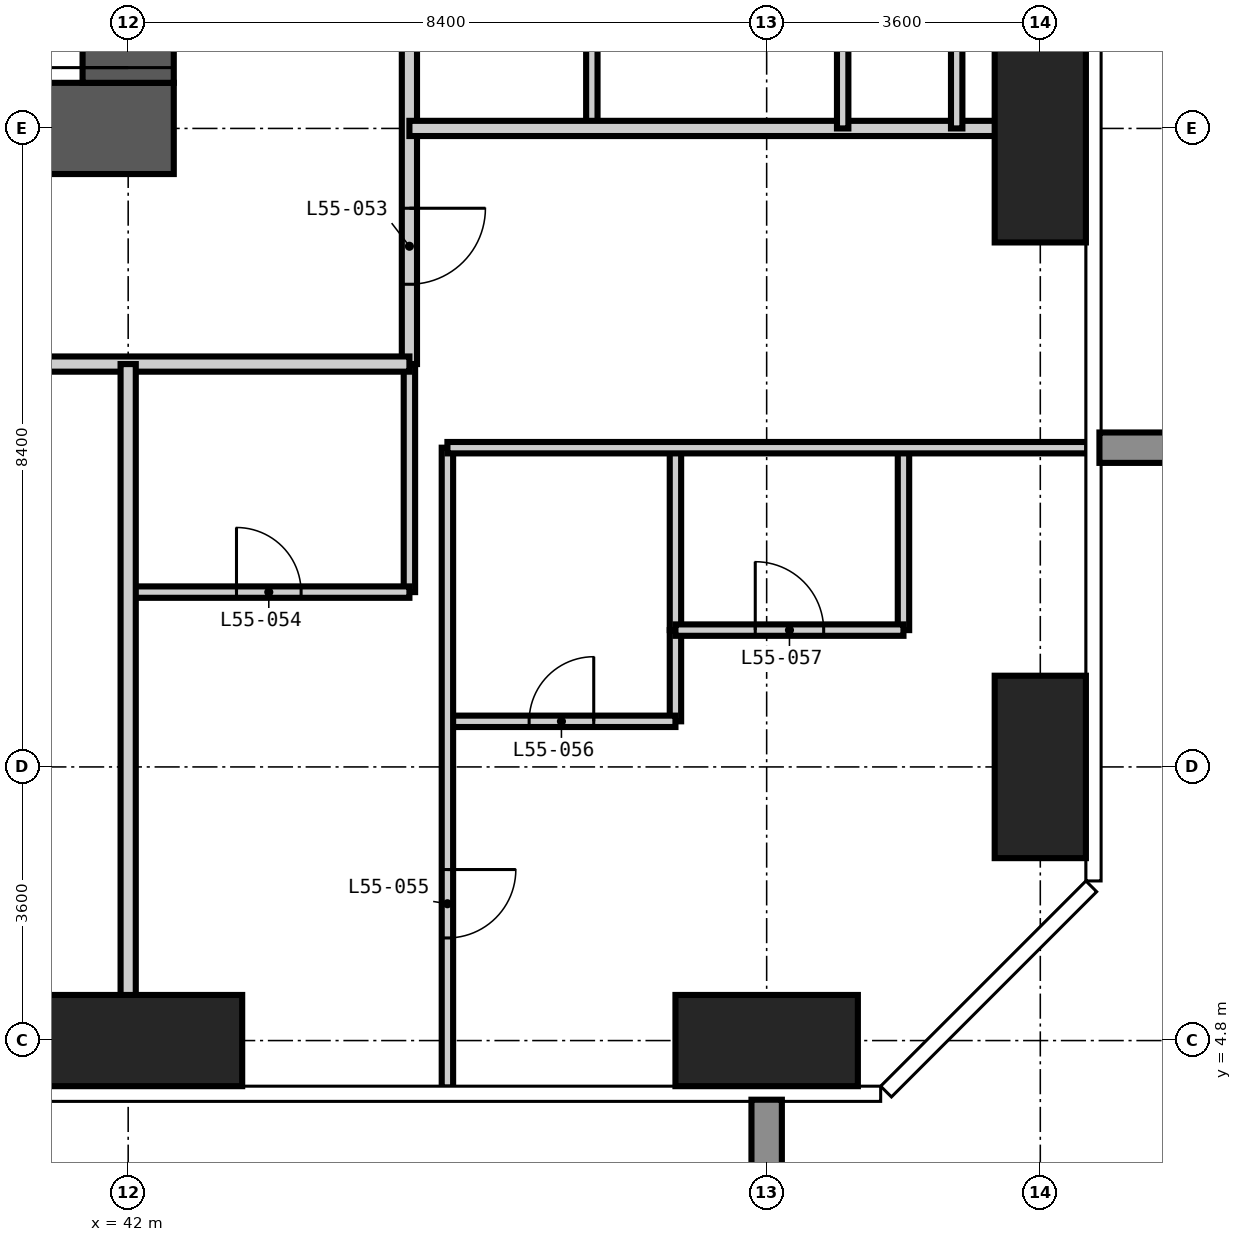
"""IFC4 building model, lengths in metres.
Left out: names, types, materials, properties, quantities, classifications, styles, units other than length and angle.
Written with IfcOpenShell. Run it as: python <this file> out.ifc"""

import sys

from ifc_helpers import new_model, si_unit, direction, frame, frame_2d, origin, origin_2d, place, context, subcontext, project, spatial, rectangle, extrude, element, fill, save


model = new_model("IFC4")
c1 = context("Model", 3, precision=1e-05, world=origin(), true_north=direction((0.0, 1.0)))
c2 = subcontext(c1, "Body", "Model", "MODEL_VIEW")
j1 = project(units=[si_unit("LENGTHUNIT", "METRE"), si_unit("PLANEANGLEUNIT", "RADIAN")], contexts=[c1])
p1 = place(None, origin())
s1 = spatial("IfcSite", under=j1, at=p1, CompositionType="ELEMENT")
p2 = place(p1, origin())
s2 = spatial("IfcBuilding", under=s1, at=p2, CompositionType="ELEMENT")
p3 = place(p2, frame((0.0, 0.0, 213.0)))
s3 = spatial("IfcBuildingStorey", under=s2, at=p3, CompositionType="ELEMENT", Elevation=213.0)
p4 = place(p3, frame((42.0, 4.8, -0.35), z_axis=(0.0, 0.0, 1.0), x_axis=(1.0, 0.0, 0.0)))
e1 = element("IfcColumn", 1, at=p4, inside=s3, PredefinedType="COLUMN", context=c2, shape_type="SweptSolid", body=[
    extrude(rectangle(XDim=3.0, YDim=1.2, at=origin_2d()), origin(), (0.0, 0.0, 1.0), 3.6),
])
p5 = place(p3, frame((50.4, 4.8, -0.35), z_axis=(0.0, 0.0, 1.0), x_axis=(1.0, 0.0, 0.0)))
e2 = element("IfcColumn", 2, at=p5, inside=s3, PredefinedType="COLUMN", context=c2, shape_type="SweptSolid", body=[
    extrude(rectangle(XDim=2.4, YDim=1.2, at=origin_2d()), origin(), (0.0, 0.0, 1.0), 3.6),
])
p6 = place(p3, frame((54.0, 8.4, -0.35), z_axis=(0.0, 0.0, 1.0), x_axis=(1.0, 0.0, 0.0)))
e3 = element("IfcColumn", 3, at=p6, inside=s3, PredefinedType="COLUMN", context=c2, shape_type="SweptSolid", body=[
    extrude(rectangle(XDim=1.2, YDim=2.4, at=origin_2d()), origin(), (0.0, 0.0, 1.0), 3.6),
])
p7 = place(p3, frame((54.0, 16.8, -0.35), z_axis=(0.0, 0.0, 1.0), x_axis=(1.0, 0.0, 0.0)))
e4 = element("IfcColumn", 4, at=p7, inside=s3, PredefinedType="COLUMN", context=c2, shape_type="SweptSolid", body=[
    extrude(rectangle(XDim=1.2, YDim=3.0, at=origin_2d()), origin(), (0.0, 0.0, 1.0), 3.6),
])
p8 = place(p3, frame((16.2, 16.8, -0.35), z_axis=(0.0, 0.0, 1.0), x_axis=(1.0, 0.0, 0.0)))
e5 = element("IfcWall", 5, at=p8, inside=s3, PredefinedType="SHEAR", context=c2, shape_type="SweptSolid", body=[
    extrude(rectangle(XDim=26.4, YDim=1.2, at=frame_2d((13.2, 0.0))), origin(), (0.0, 0.0, 1.0), 3.6),
])
p9 = place(p8, frame((12.7, 0.0, 0.35)))
e6 = element("IfcOpeningElement", 6, at=p9, cuts=e5, PredefinedType="OPENING", context=c2, shape_type="SweptSolid", body=[
    extrude(rectangle(XDim=1.0, YDim=2.1, at=frame_2d((0.5, 1.05))), frame((0.0, 0.61, 0.0), z_axis=(0.0, -1.0, 0.0), x_axis=(1.0, 0.0, 0.0)), (0.0, 0.0, 1.0), 1.22),
])
p10 = place(p8, frame((19.0, 0.0, 0.35)))
e7 = element("IfcOpeningElement", 7, at=p10, cuts=e5, PredefinedType="OPENING", context=c2, shape_type="SweptSolid", body=[
    extrude(rectangle(XDim=1.0, YDim=2.1, at=frame_2d((0.5, 1.05))), frame((0.0, 0.61, 0.0), z_axis=(0.0, -1.0, 0.0), x_axis=(1.0, 0.0, 0.0)), (0.0, 0.0, 1.0), 1.22),
])
p11 = place(p3, frame((42.0, 17.4, -0.35), z_axis=(0.0, 0.0, 1.0), x_axis=(0.0, 1.0, 0.0)))
e8 = element("IfcWall", 8, at=p11, inside=s3, PredefinedType="SHEAR", context=c2, shape_type="SweptSolid", body=[
    extrude(rectangle(XDim=24.0, YDim=1.2, at=frame_2d((12.0, 0.0))), origin(), (0.0, 0.0, 1.0), 3.6),
])
p12 = place(p11, frame((0.2, 0.0, 0.35)))
e9 = element("IfcOpeningElement", 9, at=p12, cuts=e8, PredefinedType="OPENING", context=c2, shape_type="SweptSolid", body=[
    extrude(rectangle(XDim=1.2, YDim=2.2, at=frame_2d((0.6, 1.1))), frame((0.0, 0.61, 0.0), z_axis=(0.0, -1.0, 0.0), x_axis=(1.0, 0.0, 0.0)), (0.0, 0.0, 1.0), 1.22),
])
p13 = place(p11, frame((11.5, 0.0, 0.35)))
e10 = element("IfcOpeningElement", 10, at=p13, cuts=e8, PredefinedType="OPENING", context=c2, shape_type="SweptSolid", body=[
    extrude(rectangle(XDim=1.0, YDim=2.1, at=frame_2d((0.5, 1.05))), frame((0.0, 0.61, 0.0), z_axis=(0.0, -1.0, 0.0), x_axis=(1.0, 0.0, 0.0)), (0.0, 0.0, 1.0), 1.22),
])
p14 = place(p11, frame((19.9, 0.0, 0.35)))
e11 = element("IfcOpeningElement", 11, at=p14, cuts=e8, PredefinedType="OPENING", context=c2, shape_type="SweptSolid", body=[
    extrude(rectangle(XDim=1.0, YDim=2.1, at=frame_2d((0.5, 1.05))), frame((0.0, 0.61, 0.0), z_axis=(0.0, -1.0, 0.0), x_axis=(1.0, 0.0, 0.0)), (0.0, 0.0, 1.0), 1.22),
])
p15 = place(p3, frame((45.7, 10.7, 0.0), z_axis=(0.0, 0.0, 1.0), x_axis=(0.0, 1.0, 0.0)))
e12 = element("IfcWall", 12, at=p15, inside=s3, PredefinedType="PARTITIONING", context=c2, shape_type="SweptSolid", body=[
    extrude(rectangle(XDim=3.0, YDim=0.15, at=frame_2d((1.5, 0.0))), origin(), (0.0, 0.0, 1.0), 3.25),
])
p16 = place(p3, frame((48.1, 16.8, 0.0), z_axis=(0.0, 0.0, 1.0), x_axis=(0.0, 1.0, 0.0)))
e13 = element("IfcWall", 13, at=p16, inside=s3, PredefinedType="PARTITIONING", context=c2, shape_type="SweptSolid", body=[
    extrude(rectangle(XDim=2.7, YDim=0.15, at=frame_2d((1.35, 0.0))), origin(), (0.0, 0.0, 1.0), 3.25),
])
p17 = place(p3, frame((49.2, 9.0, 0.0), z_axis=(0.0, 0.0, 1.0), x_axis=(0.0, 1.0, 0.0)))
e14 = element("IfcWall", 14, at=p17, inside=s3, PredefinedType="PARTITIONING", context=c2, shape_type="SweptSolid", body=[
    extrude(rectangle(XDim=1.2, YDim=0.15, at=frame_2d((0.6, 0.0))), origin(), (0.0, 0.0, 1.0), 3.25),
])
p18 = place(p3, frame((46.2, 9.0, 0.0), z_axis=(0.0, 0.0, 1.0), x_axis=(1.0, 0.0, 0.0)))
e15 = element("IfcWall", 15, at=p18, inside=s3, PredefinedType="PARTITIONING", context=c2, shape_type="SweptSolid", body=[
    extrude(rectangle(XDim=3.0, YDim=0.15, at=frame_2d((1.5, 0.0))), origin(), (0.0, 0.0, 1.0), 3.25),
])
p19 = place(p18, frame((1.075, 0.0, 0.0)))
e16 = element("IfcOpeningElement", 16, at=p19, cuts=e15, PredefinedType="OPENING", context=c2, shape_type="SweptSolid", body=[
    extrude(rectangle(XDim=0.85, YDim=2.1, at=frame_2d((0.425, 1.05))), frame((0.0, 0.085, 0.0), z_axis=(0.0, -1.0, 0.0), x_axis=(1.0, 0.0, 0.0)), (0.0, 0.0, 1.0), 0.17),
])
p20 = place(p3, frame((42.0, 10.7, 0.0), z_axis=(0.0, 0.0, 1.0), x_axis=(1.0, 0.0, 0.0)))
e17 = element("IfcWall", 17, at=p20, inside=s3, PredefinedType="PARTITIONING", context=c2, shape_type="SweptSolid", body=[
    extrude(rectangle(XDim=3.7, YDim=0.15, at=frame_2d((1.85, 0.0))), origin(), (0.0, 0.0, 1.0), 3.25),
])
p21 = place(p20, frame((1.425, 0.0, 0.0)))
e18 = element("IfcOpeningElement", 18, at=p21, cuts=e17, PredefinedType="OPENING", context=c2, shape_type="SweptSolid", body=[
    extrude(rectangle(XDim=0.85, YDim=2.1, at=frame_2d((0.425, 1.05))), frame((0.0, 0.085, 0.0), z_axis=(0.0, -1.0, 0.0), x_axis=(1.0, 0.0, 0.0)), (0.0, 0.0, 1.0), 0.17),
])
p22 = place(p3, frame((45.7, 44.5, 0.0), z_axis=(0.0, 0.0, 1.0), x_axis=(0.0, -1.0, 0.0)))
e19 = element("IfcWall", 19, at=p22, inside=s3, PredefinedType="PARTITIONING", context=c2, shape_type="SweptSolid", body=[
    extrude(rectangle(XDim=30.8, YDim=0.2, at=frame_2d((15.4, 0.0))), origin(), (0.0, 0.0, 1.0), 3.25),
])
p23 = place(p22, frame((23.0, 0.0, 0.0)))
e20 = element("IfcOpeningElement", 20, at=p23, cuts=e19, PredefinedType="OPENING", context=c2, shape_type="SweptSolid", body=[
    extrude(rectangle(XDim=1.0, YDim=2.2, at=frame_2d((0.5, 1.1))), frame((0.0, 0.11, 0.0), z_axis=(0.0, -1.0, 0.0), x_axis=(1.0, 0.0, 0.0)), (0.0, 0.0, 1.0), 0.22),
])
p24 = place(p22, frame((14.6, 0.0, 0.0)))
e21 = element("IfcOpeningElement", 21, at=p24, cuts=e19, PredefinedType="OPENING", context=c2, shape_type="SweptSolid", body=[
    extrude(rectangle(XDim=1.0, YDim=2.2, at=frame_2d((0.5, 1.1))), frame((0.0, 0.11, 0.0), z_axis=(0.0, -1.0, 0.0), x_axis=(1.0, 0.0, 0.0)), (0.0, 0.0, 1.0), 0.22),
])
p25 = place(p22, frame((6.2, 0.0, 0.0)))
e22 = element("IfcOpeningElement", 22, at=p25, cuts=e19, PredefinedType="OPENING", context=c2, shape_type="SweptSolid", body=[
    extrude(rectangle(XDim=1.0, YDim=2.2, at=frame_2d((0.5, 1.1))), frame((0.0, 0.11, 0.0), z_axis=(0.0, -1.0, 0.0), x_axis=(1.0, 0.0, 0.0)), (0.0, 0.0, 1.0), 0.22),
])
p26 = place(p22, frame((28.75, 0.0, 0.0)))
e23 = element("IfcOpeningElement", 23, at=p26, cuts=e19, PredefinedType="OPENING", context=c2, shape_type="SweptSolid", body=[
    extrude(rectangle(XDim=1.0, YDim=2.2, at=frame_2d((0.5, 1.1))), frame((0.0, 0.11, 0.0), z_axis=(0.0, -1.0, 0.0), x_axis=(1.0, 0.0, 0.0)), (0.0, 0.0, 1.0), 0.22),
])
p27 = place(p22, frame((0.75, 0.0, 0.0)))
e24 = element("IfcOpeningElement", 24, at=p27, cuts=e19, PredefinedType="OPENING", context=c2, shape_type="SweptSolid", body=[
    extrude(rectangle(XDim=1.0, YDim=2.2, at=frame_2d((0.5, 1.1))), frame((0.0, 0.11, 0.0), z_axis=(0.0, -1.0, 0.0), x_axis=(1.0, 0.0, 0.0)), (0.0, 0.0, 1.0), 0.22),
])
p28 = place(p3, frame((45.7, 13.7, 0.0), z_axis=(0.0, 0.0, 1.0), x_axis=(-1.0, 0.0, 0.0)))
e25 = element("IfcWall", 25, at=p28, inside=s3, PredefinedType="PARTITIONING", context=c2, shape_type="SweptSolid", body=[
    extrude(rectangle(XDim=32.0, YDim=0.2, at=frame_2d((16.0, 0.0))), origin(), (0.0, 0.0, 1.0), 3.25),
])
p29 = place(p28, frame((26.3, 0.0, 0.0)))
e26 = element("IfcOpeningElement", 26, at=p29, cuts=e25, PredefinedType="OPENING", context=c2, shape_type="SweptSolid", body=[
    extrude(rectangle(XDim=1.0, YDim=2.2, at=frame_2d((0.5, 1.1))), frame((0.0, 0.11, 0.0), z_axis=(0.0, -1.0, 0.0), x_axis=(1.0, 0.0, 0.0)), (0.0, 0.0, 1.0), 0.22),
])
p30 = place(p28, frame((22.1, 0.0, 0.0)))
e27 = element("IfcOpeningElement", 27, at=p30, cuts=e25, PredefinedType="OPENING", context=c2, shape_type="SweptSolid", body=[
    extrude(rectangle(XDim=1.0, YDim=2.2, at=frame_2d((0.5, 1.1))), frame((0.0, 0.11, 0.0), z_axis=(0.0, -1.0, 0.0), x_axis=(1.0, 0.0, 0.0)), (0.0, 0.0, 1.0), 0.22),
])
p31 = place(p28, frame((17.9, 0.0, 0.0)))
e28 = element("IfcOpeningElement", 28, at=p31, cuts=e25, PredefinedType="OPENING", context=c2, shape_type="SweptSolid", body=[
    extrude(rectangle(XDim=1.0, YDim=2.2, at=frame_2d((0.5, 1.1))), frame((0.0, 0.11, 0.0), z_axis=(0.0, -1.0, 0.0), x_axis=(1.0, 0.0, 0.0)), (0.0, 0.0, 1.0), 0.22),
])
p32 = place(p28, frame((13.7, 0.0, 0.0)))
e29 = element("IfcOpeningElement", 29, at=p32, cuts=e25, PredefinedType="OPENING", context=c2, shape_type="SweptSolid", body=[
    extrude(rectangle(XDim=1.0, YDim=2.2, at=frame_2d((0.5, 1.1))), frame((0.0, 0.11, 0.0), z_axis=(0.0, -1.0, 0.0), x_axis=(1.0, 0.0, 0.0)), (0.0, 0.0, 1.0), 0.22),
])
p33 = place(p28, frame((9.5, 0.0, 0.0)))
e30 = element("IfcOpeningElement", 30, at=p33, cuts=e25, PredefinedType="OPENING", context=c2, shape_type="SweptSolid", body=[
    extrude(rectangle(XDim=1.0, YDim=2.2, at=frame_2d((0.5, 1.1))), frame((0.0, 0.11, 0.0), z_axis=(0.0, -1.0, 0.0), x_axis=(1.0, 0.0, 0.0)), (0.0, 0.0, 1.0), 0.22),
])
p34 = place(p28, frame((5.3, 0.0, 0.0)))
e31 = element("IfcOpeningElement", 31, at=p34, cuts=e25, PredefinedType="OPENING", context=c2, shape_type="SweptSolid", body=[
    extrude(rectangle(XDim=1.0, YDim=2.2, at=frame_2d((0.5, 1.1))), frame((0.0, 0.11, 0.0), z_axis=(0.0, -1.0, 0.0), x_axis=(1.0, 0.0, 0.0)), (0.0, 0.0, 1.0), 0.22),
])
p35 = place(p3, frame((42.0, 4.182, 0.0), z_axis=(0.0, 0.0, 1.0), x_axis=(0.0, 1.0, 0.0)))
e32 = element("IfcWall", 32, at=p35, inside=s3, PredefinedType="PARTITIONING", context=c2, shape_type="SweptSolid", body=[
    extrude(rectangle(XDim=9.518, YDim=0.2, at=frame_2d((4.759, 0.0))), origin(), (0.0, 0.0, 1.0), 3.25),
])
p36 = place(p3, frame((45.7, 16.8, 0.0), z_axis=(0.0, 0.0, 1.0), x_axis=(1.0, 0.0, 0.0)))
e33 = element("IfcWall", 33, at=p36, inside=s3, PredefinedType="PARTITIONING", context=c2, shape_type="SweptSolid", body=[
    extrude(rectangle(XDim=8.918, YDim=0.2, at=frame_2d((4.459, 0.0))), origin(), (0.0, 0.0, 1.0), 3.25),
])
p37 = place(p3, frame((46.2, 4.182, 0.0), z_axis=(0.0, 0.0, 1.0), x_axis=(0.0, 1.0, 0.0)))
e34 = element("IfcWall", 34, at=p37, inside=s3, PredefinedType="PARTITIONING", context=c2, shape_type="SweptSolid", body=[
    extrude(rectangle(XDim=8.418, YDim=0.15, at=frame_2d((4.209, 0.0))), origin(), (0.0, 0.0, 1.0), 3.25),
])
p38 = place(p37, frame((1.968, 0.0, 0.0)))
e35 = element("IfcOpeningElement", 35, at=p38, cuts=e34, PredefinedType="OPENING", context=c2, shape_type="SweptSolid", body=[
    extrude(rectangle(XDim=0.9, YDim=2.1, at=frame_2d((0.45, 1.05))), frame((0.0, 0.085, 0.0), z_axis=(0.0, -1.0, 0.0), x_axis=(1.0, 0.0, 0.0)), (0.0, 0.0, 1.0), 0.17),
])
p39 = place(p3, frame((49.2, 10.2, 0.0), z_axis=(0.0, 0.0, 1.0), x_axis=(0.0, 1.0, 0.0)))
e36 = element("IfcWall", 36, at=p39, inside=s3, PredefinedType="PARTITIONING", context=c2, shape_type="SweptSolid", body=[
    extrude(rectangle(XDim=2.4, YDim=0.15, at=frame_2d((1.2, 0.0))), origin(), (0.0, 0.0, 1.0), 3.25),
])
p40 = place(p3, frame((51.4, 16.8, 0.0), z_axis=(0.0, 0.0, 1.0), x_axis=(0.0, 1.0, 0.0)))
e37 = element("IfcWall", 37, at=p40, inside=s3, PredefinedType="PARTITIONING", context=c2, shape_type="SweptSolid", body=[
    extrude(rectangle(XDim=2.7, YDim=0.15, at=frame_2d((1.35, 0.0))), origin(), (0.0, 0.0, 1.0), 3.25),
])
p41 = place(p3, frame((52.2, 10.2, 0.0), z_axis=(0.0, 0.0, 1.0), x_axis=(0.0, 1.0, 0.0)))
e38 = element("IfcWall", 38, at=p41, inside=s3, PredefinedType="PARTITIONING", context=c2, shape_type="SweptSolid", body=[
    extrude(rectangle(XDim=2.4, YDim=0.15, at=frame_2d((1.2, 0.0))), origin(), (0.0, 0.0, 1.0), 3.25),
])
p42 = place(p3, frame((52.9, 16.8, 0.0), z_axis=(0.0, 0.0, 1.0), x_axis=(0.0, 1.0, 0.0)))
e39 = element("IfcWall", 39, at=p42, inside=s3, PredefinedType="PARTITIONING", context=c2, shape_type="SweptSolid", body=[
    extrude(rectangle(XDim=2.7, YDim=0.15, at=frame_2d((1.35, 0.0))), origin(), (0.0, 0.0, 1.0), 3.25),
])
p43 = place(p42, frame((1.6, 0.0, 0.0)))
e40 = element("IfcOpeningElement", 40, at=p43, cuts=e39, PredefinedType="OPENING", context=c2, shape_type="SweptSolid", body=[
    extrude(rectangle(XDim=0.9, YDim=2.1, at=frame_2d((0.45, 1.05))), frame((0.0, 0.085, 0.0), z_axis=(0.0, -1.0, 0.0), x_axis=(1.0, 0.0, 0.0)), (0.0, 0.0, 1.0), 0.17),
])
p44 = place(p3, frame((49.2, 10.2, 0.0), z_axis=(0.0, 0.0, 1.0), x_axis=(1.0, 0.0, 0.0)))
e41 = element("IfcWall", 41, at=p44, inside=s3, PredefinedType="PARTITIONING", context=c2, shape_type="SweptSolid", body=[
    extrude(rectangle(XDim=3.0, YDim=0.15, at=frame_2d((1.5, 0.0))), origin(), (0.0, 0.0, 1.0), 3.25),
])
p45 = place(p44, frame((1.05, 0.0, 0.0)))
e42 = element("IfcOpeningElement", 42, at=p45, cuts=e41, PredefinedType="OPENING", context=c2, shape_type="SweptSolid", body=[
    extrude(rectangle(XDim=0.9, YDim=2.1, at=frame_2d((0.45, 1.05))), frame((0.0, 0.085, 0.0), z_axis=(0.0, -1.0, 0.0), x_axis=(1.0, 0.0, 0.0)), (0.0, 0.0, 1.0), 0.17),
])
p46 = place(p3, frame((46.2, 12.6, 0.0), z_axis=(0.0, 0.0, 1.0), x_axis=(1.0, 0.0, 0.0)))
e43 = element("IfcWall", 43, at=p46, inside=s3, PredefinedType="PARTITIONING", context=c2, shape_type="SweptSolid", body=[
    extrude(rectangle(XDim=8.418, YDim=0.15, at=frame_2d((4.209, 0.0))), origin(), (0.0, 0.0, 1.0), 3.25),
])
p47 = place(p12, origin())
e44 = element("IfcDoor", 44, at=p47, inside=s3, OperationType="SINGLE_SWING_LEFT", PredefinedType="DOOR", context=c2, shape_type="SweptSolid", body=[
    extrude(rectangle(XDim=1.2, YDim=2.2, at=frame_2d((0.6, 1.1))), frame((0.0, 0.025, 0.0), z_axis=(0.0, -1.0, 0.0), x_axis=(1.0, 0.0, 0.0)), (0.0, 0.0, 1.0), 0.05),
])
fill(e9, e44)
p48 = place(p26, origin())
e45 = element("IfcDoor", 45, at=p48, inside=s3, OperationType="SINGLE_SWING_LEFT", PredefinedType="DOOR", context=c2, shape_type="SweptSolid", body=[
    extrude(rectangle(XDim=1.0, YDim=2.2, at=frame_2d((0.5, 1.1))), frame((0.0, 0.025, 0.0), z_axis=(0.0, -1.0, 0.0), x_axis=(1.0, 0.0, 0.0)), (0.0, 0.0, 1.0), 0.05),
])
fill(e23, e45)
p49 = place(p21, origin())
e46 = element("IfcDoor", 46, at=p49, inside=s3, OperationType="SINGLE_SWING_LEFT", PredefinedType="DOOR", context=c2, shape_type="SweptSolid", body=[
    extrude(rectangle(XDim=0.85, YDim=2.1, at=frame_2d((0.425, 1.05))), frame((0.0, 0.025, 0.0), z_axis=(0.0, -1.0, 0.0), x_axis=(1.0, 0.0, 0.0)), (0.0, 0.0, 1.0), 0.05),
])
fill(e18, e46)
p50 = place(p38, frame((0.9, 0.0, 0.0), z_axis=(0.0, 0.0, 1.0), x_axis=(-1.0, 0.0, 0.0)))
e47 = element("IfcDoor", 47, at=p50, inside=s3, OperationType="SINGLE_SWING_LEFT", PredefinedType="DOOR", context=c2, shape_type="SweptSolid", body=[
    extrude(rectangle(XDim=0.9, YDim=2.1, at=frame_2d((0.45, 1.05))), frame((0.0, 0.025, 0.0), z_axis=(0.0, -1.0, 0.0), x_axis=(1.0, 0.0, 0.0)), (0.0, 0.0, 1.0), 0.05),
])
fill(e35, e47)
p51 = place(p19, origin())
e48 = element("IfcDoor", 48, at=p51, inside=s3, OperationType="SINGLE_SWING_RIGHT", PredefinedType="DOOR", context=c2, shape_type="SweptSolid", body=[
    extrude(rectangle(XDim=0.85, YDim=2.1, at=frame_2d((0.425, 1.05))), frame((0.0, 0.025, 0.0), z_axis=(0.0, -1.0, 0.0), x_axis=(1.0, 0.0, 0.0)), (0.0, 0.0, 1.0), 0.05),
])
fill(e16, e48)
p52 = place(p45, origin())
e49 = element("IfcDoor", 49, at=p52, inside=s3, OperationType="SINGLE_SWING_LEFT", PredefinedType="DOOR", context=c2, shape_type="SweptSolid", body=[
    extrude(rectangle(XDim=0.9, YDim=2.1, at=frame_2d((0.45, 1.05))), frame((0.0, 0.025, 0.0), z_axis=(0.0, -1.0, 0.0), x_axis=(1.0, 0.0, 0.0)), (0.0, 0.0, 1.0), 0.05),
])
fill(e42, e49)
save(model, sys.argv[1])
